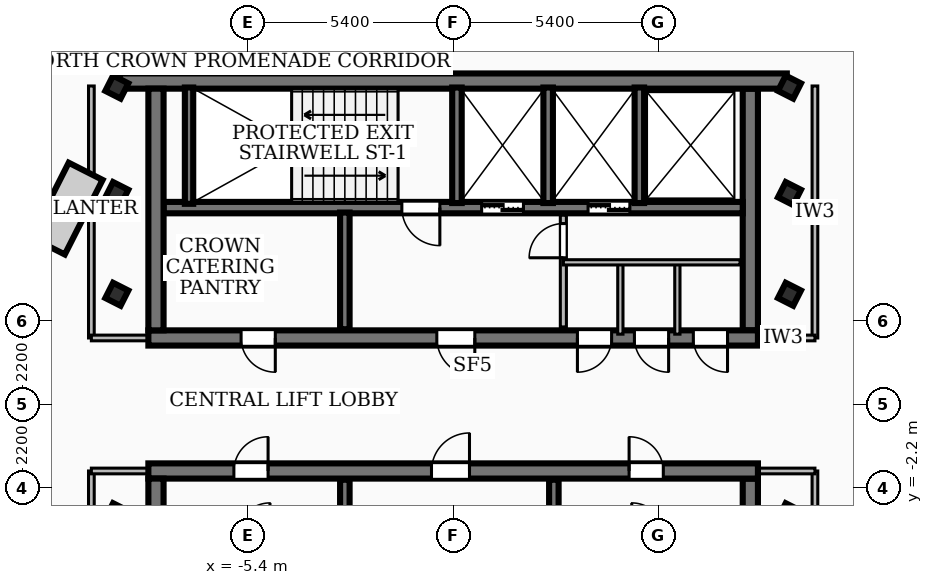
"""IFC4 building model, lengths in metres.
Left out: names, types, materials, properties, quantities, classifications, styles, units other than length and angle.
Written with IfcOpenShell. Run it as: python <this file> out.ifc"""

import sys

from ifc_helpers import new_model, si_unit, direction, frame, frame_2d, origin, origin_2d, place, context, subcontext, project, spatial, rectangle, hollow_rectangle, extrude, element, fill, save


model = new_model("IFC4")
c1 = context("Model", 3, precision=1e-05, world=origin(), true_north=direction((0.0, 1.0)))
c2 = subcontext(c1, "Body", "Model", "MODEL_VIEW")
j1 = project(units=[si_unit("LENGTHUNIT", "METRE"), si_unit("PLANEANGLEUNIT", "RADIAN")], contexts=[c1])
p1 = place(None, origin())
s1 = spatial("IfcSite", under=j1, at=p1, CompositionType="ELEMENT")
p2 = place(p1, origin())
s2 = spatial("IfcBuilding", under=s1, at=p2, CompositionType="ELEMENT")
p3 = place(p2, frame((0.0, 0.0, 289.26)))
s3 = spatial("IfcBuildingStorey", under=s2, at=p3, CompositionType="ELEMENT", Elevation=289.26)
p4 = place(p3, frame((-8.78, 8.51, 0.0), z_axis=(0.0, 0.0, 1.0), x_axis=(1.0, 0.0, 0.0)))
e1 = element("IfcWall", 1, at=p4, inside=s3, PredefinedType="SHEAR", context=c2, shape_type="SweptSolid", body=[
    extrude(rectangle(XDim=17.56, YDim=0.4, at=frame_2d((8.78, 0.0))), origin(), (0.0, 0.0, 1.0), 3.84),
])
p5 = place(p3, frame((8.02, 1.75, 0.0), z_axis=(0.0, 0.0, 1.0), x_axis=(-1.0, 0.0, 0.0)))
e2 = element("IfcWall", 2, at=p5, inside=s3, PredefinedType="SHEAR", context=c2, shape_type="SweptSolid", body=[
    extrude(rectangle(XDim=16.04, YDim=0.4, at=frame_2d((8.02, 0.0))), origin(), (0.0, 0.0, 1.0), 3.84),
])
p6 = place(p5, frame((7.45, 0.0, 0.0)))
e3 = element("IfcOpeningElement", 3, at=p6, cuts=e2, PredefinedType="OPENING", context=c2, shape_type="SweptSolid", body=[
    extrude(rectangle(XDim=1.0, YDim=2.1, at=frame_2d((0.5, 1.05))), frame((0.0, 0.21, 0.0), z_axis=(0.0, -1.0, 0.0), x_axis=(1.0, 0.0, 0.0)), (0.0, 0.0, 1.0), 0.42),
])
p7 = place(p5, frame((12.7, 0.0, 0.0)))
e4 = element("IfcOpeningElement", 4, at=p7, cuts=e2, PredefinedType="OPENING", context=c2, shape_type="SweptSolid", body=[
    extrude(rectangle(XDim=0.9, YDim=2.06, at=frame_2d((0.45, 1.03))), frame((0.0, 0.21, 0.0), z_axis=(0.0, -1.0, 0.0), x_axis=(1.0, 0.0, 0.0)), (0.0, 0.0, 1.0), 0.42),
])
p8 = place(p5, frame((3.85, 0.0, 0.0)))
e5 = element("IfcOpeningElement", 5, at=p8, cuts=e2, PredefinedType="OPENING", context=c2, shape_type="SweptSolid", body=[
    extrude(rectangle(XDim=0.9, YDim=2.06, at=frame_2d((0.45, 1.03))), frame((0.0, 0.21, 0.0), z_axis=(0.0, -1.0, 0.0), x_axis=(1.0, 0.0, 0.0)), (0.0, 0.0, 1.0), 0.42),
])
p9 = place(p5, frame((2.35, 0.0, 0.0)))
e6 = element("IfcOpeningElement", 6, at=p9, cuts=e2, PredefinedType="OPENING", context=c2, shape_type="SweptSolid", body=[
    extrude(rectangle(XDim=0.9, YDim=2.06, at=frame_2d((0.45, 1.03))), frame((0.0, 0.21, 0.0), z_axis=(0.0, -1.0, 0.0), x_axis=(1.0, 0.0, 0.0)), (0.0, 0.0, 1.0), 0.42),
])
p10 = place(p5, frame((0.8, 0.0, 0.0)))
e7 = element("IfcOpeningElement", 7, at=p10, cuts=e2, PredefinedType="OPENING", context=c2, shape_type="SweptSolid", body=[
    extrude(rectangle(XDim=0.9, YDim=2.06, at=frame_2d((0.45, 1.03))), frame((0.0, 0.21, 0.0), z_axis=(0.0, -1.0, 0.0), x_axis=(1.0, 0.0, 0.0)), (0.0, 0.0, 1.0), 0.42),
])
for number, where, z_axis, x_axis in (
    (8, (-7.82, 1.95, 0.0), (0.0, 0.0, 1.0), (0.0, 1.0, 0.0)),
    (9, (7.82, 8.31, 0.0), (0.0, 0.0, 1.0), (0.0, -1.0, 0.0)),
):
    element("IfcWall", number, at=place(p3, frame(where, z_axis=z_axis, x_axis=x_axis)), inside=s3, PredefinedType="SHEAR", context=c2, shape_type="SweptSolid", body=[
        extrude(rectangle(XDim=6.36, YDim=0.4, at=frame_2d((3.18, 0.0))), origin(), (0.0, 0.0, 1.0), 3.84),
    ])
p11 = place(p3, frame((7.62, 5.18, 0.0), z_axis=(0.0, 0.0, 1.0), x_axis=(-1.0, 0.0, 0.0)))
e10 = element("IfcWall", 10, at=p11, inside=s3, PredefinedType="SOLIDWALL", context=c2, shape_type="SweptSolid", body=[
    extrude(rectangle(XDim=15.24, YDim=0.3, at=frame_2d((7.62, 0.0))), origin(), (0.0, 0.0, 1.0), 3.84),
])
p12 = place(p11, frame((5.77, 0.0, 0.0)))
e11 = element("IfcOpeningElement", 11, at=p12, cuts=e10, PredefinedType="OPENING", context=c2, shape_type="SweptSolid", body=[
    extrude(rectangle(XDim=1.1, YDim=2.15, at=frame_2d((0.55, 1.075))), frame((0.0, 0.16, 0.0), z_axis=(0.0, -1.0, 0.0), x_axis=(1.0, 0.0, 0.0)), (0.0, 0.0, 1.0), 0.32),
])
p13 = place(p11, frame((2.97, 0.0, 0.0)))
e12 = element("IfcOpeningElement", 12, at=p13, cuts=e10, PredefinedType="OPENING", context=c2, shape_type="SweptSolid", body=[
    extrude(rectangle(XDim=1.1, YDim=2.15, at=frame_2d((0.55, 1.075))), frame((0.0, 0.16, 0.0), z_axis=(0.0, -1.0, 0.0), x_axis=(1.0, 0.0, 0.0)), (0.0, 0.0, 1.0), 0.32),
])
p14 = place(p11, frame((7.97, 0.0, 0.0)))
e13 = element("IfcOpeningElement", 13, at=p14, cuts=e10, PredefinedType="OPENING", context=c2, shape_type="SweptSolid", body=[
    extrude(rectangle(XDim=1.0, YDim=2.1, at=frame_2d((0.5, 1.05))), frame((0.0, 0.16, 0.0), z_axis=(0.0, -1.0, 0.0), x_axis=(1.0, 0.0, 0.0)), (0.0, 0.0, 1.0), 0.32),
])
p15 = place(p3, frame((-8.02, -1.75, 0.0), z_axis=(0.0, 0.0, 1.0), x_axis=(1.0, 0.0, 0.0)))
e14 = element("IfcWall", 14, at=p15, inside=s3, PredefinedType="SHEAR", context=c2, shape_type="SweptSolid", body=[
    extrude(rectangle(XDim=16.04, YDim=0.4, at=frame_2d((8.02, 0.0))), origin(), (0.0, 0.0, 1.0), 3.84),
])
p16 = place(p15, frame((7.45, 0.0, 0.0)))
e15 = element("IfcOpeningElement", 15, at=p16, cuts=e14, PredefinedType="OPENING", context=c2, shape_type="SweptSolid", body=[
    extrude(rectangle(XDim=1.0, YDim=2.1, at=frame_2d((0.5, 1.05))), frame((0.0, 0.21, 0.0), z_axis=(0.0, -1.0, 0.0), x_axis=(1.0, 0.0, 0.0)), (0.0, 0.0, 1.0), 0.42),
])
p17 = place(p15, frame((12.65, 0.0, 0.0)))
e16 = element("IfcOpeningElement", 16, at=p17, cuts=e14, PredefinedType="OPENING", context=c2, shape_type="SweptSolid", body=[
    extrude(rectangle(XDim=0.9, YDim=2.06, at=frame_2d((0.45, 1.03))), frame((0.0, 0.21, 0.0), z_axis=(0.0, -1.0, 0.0), x_axis=(1.0, 0.0, 0.0)), (0.0, 0.0, 1.0), 0.42),
])
p18 = place(p15, frame((2.25, 0.0, 0.0)))
e17 = element("IfcOpeningElement", 17, at=p18, cuts=e14, PredefinedType="OPENING", context=c2, shape_type="SweptSolid", body=[
    extrude(rectangle(XDim=0.9, YDim=2.06, at=frame_2d((0.45, 1.03))), frame((0.0, 0.21, 0.0), z_axis=(0.0, -1.0, 0.0), x_axis=(1.0, 0.0, 0.0)), (0.0, 0.0, 1.0), 0.42),
])
for number, where, z_axis, x_axis in (
    (18, (-7.82, -8.31, 0.0), (0.0, 0.0, 1.0), (0.0, 1.0, 0.0)),
    (19, (7.82, -1.95, 0.0), (0.0, 0.0, 1.0), (0.0, -1.0, 0.0)),
):
    element("IfcWall", number, at=place(p3, frame(where, z_axis=z_axis, x_axis=x_axis)), inside=s3, PredefinedType="SHEAR", context=c2, shape_type="SweptSolid", body=[
        extrude(rectangle(XDim=6.36, YDim=0.4, at=frame_2d((3.18, 0.0))), origin(), (0.0, 0.0, 1.0), 3.84),
    ])
p19 = place(p3, frame((-6.95, 5.28, 0.0), z_axis=(0.0, 0.0, 1.0), x_axis=(0.0, 1.0, 0.0)))
e20 = element("IfcWall", 20, at=p19, inside=s3, PredefinedType="SOLIDWALL", context=c2, shape_type="SweptSolid", body=[
    extrude(rectangle(XDim=3.06, YDim=0.22, at=frame_2d((1.53, 0.0))), origin(), (0.0, 0.0, 1.0), 3.84),
])
for number, where, z_axis, x_axis in (
    (21, (0.1, 5.3, 0.0), (0.0, 0.0, 1.0), (0.0, 1.0, 0.0)),
    (22, (2.5, 5.3, 0.0), (0.0, 0.0, 1.0), (0.0, 1.0, 0.0)),
    (23, (4.9, 5.3, 0.0), (0.0, 0.0, 1.0), (0.0, 1.0, 0.0)),
):
    element("IfcWall", number, at=place(p3, frame(where, z_axis=z_axis, x_axis=x_axis)), inside=s3, PredefinedType="SOLIDWALL", context=c2, shape_type="SweptSolid", body=[
        extrude(rectangle(XDim=3.04, YDim=0.25, at=frame_2d((1.52, 0.0))), origin(), (0.0, 0.0, 1.0), 3.84),
    ])
for number, where, z_axis, x_axis in (
    (24, (-2.85, 1.98, 0.0), (0.0, 0.0, 1.0), (0.0, 1.0, 0.0)),
    (25, (-2.85, -5.05, 0.0), (0.0, 0.0, 1.0), (0.0, 1.0, 0.0)),
    (26, (2.65, -5.05, 0.0), (0.0, 0.0, 1.0), (0.0, 1.0, 0.0)),
):
    element("IfcWall", number, at=place(p3, frame(where, z_axis=z_axis, x_axis=x_axis)), inside=s3, PredefinedType="SOLIDWALL", context=c2, shape_type="SweptSolid", body=[
        extrude(rectangle(XDim=3.07, YDim=0.25, at=frame_2d((1.535, 0.0))), origin(), (0.0, 0.0, 1.0), 3.84),
    ])
for number, where, z_axis, x_axis in (
    (27, (-8.85, -2.9, 0.0), (0.0, 0.0, 1.0), (0.452, 0.892, 0.0)),
    (28, (-8.85, 2.9, 0.0), (0.0, 0.0, 1.0), (0.452, 0.892, 0.0)),
    (29, (-8.85, 5.55, 0.0), (0.0, 0.0, 1.0), (0.452, 0.892, 0.0)),
    (30, (8.85, -2.9, 0.0), (0.0, 0.0, 1.0), (0.452, 0.892, 0.0)),
    (31, (8.85, 2.9, 0.0), (0.0, 0.0, 1.0), (0.452, 0.892, 0.0)),
    (32, (8.85, 5.55, 0.0), (0.0, 0.0, 1.0), (0.452, 0.892, 0.0)),
    (33, (-8.85, 8.35, 0.0), (0.0, 0.0, 1.0), (0.452, 0.892, 0.0)),
    (34, (8.85, 8.35, 0.0), (0.0, 0.0, 1.0), (0.452, 0.892, 0.0)),
):
    element("IfcColumn", number, at=place(p3, frame(where, z_axis=z_axis, x_axis=x_axis)), inside=s3, PredefinedType="COLUMN", context=c2, shape_type="SweptSolid", body=[
        extrude(hollow_rectangle(XDim=0.45, YDim=0.45, WallThickness=0.022, at=origin_2d()), origin(), (0.0, 0.0, 1.0), 4.14),
    ])
p20 = place(p3, frame((2.9, 2.04, 0.0), z_axis=(0.0, 0.0, 1.0), x_axis=(0.0, 1.0, 0.0)))
e35 = element("IfcWall", 35, at=p20, inside=s3, PredefinedType="PARTITIONING", context=c2, shape_type="SweptSolid", body=[
    extrude(rectangle(XDim=2.94, YDim=0.16, at=frame_2d((1.47, 0.0))), origin(), (0.0, 0.0, 1.0), 3.07),
])
p21 = place(p20, frame((1.82, 0.0, 0.0)))
e36 = element("IfcOpeningElement", 36, at=p21, cuts=e35, PredefinedType="OPENING", context=c2, shape_type="SweptSolid", body=[
    extrude(rectangle(XDim=0.9, YDim=2.06, at=frame_2d((0.45, 1.03))), frame((0.0, 0.09, 0.0), z_axis=(0.0, -1.0, 0.0), x_axis=(1.0, 0.0, 0.0)), (0.0, 0.0, 1.0), 0.18),
])
p22 = place(p3, frame((2.9, 3.74, 0.0), z_axis=(0.0, 0.0, 1.0), x_axis=(1.0, 0.0, 0.0)))
e37 = element("IfcWall", 37, at=p22, inside=s3, PredefinedType="PARTITIONING", context=c2, shape_type="SweptSolid", body=[
    extrude(rectangle(XDim=4.65, YDim=0.138, at=frame_2d((2.325, 0.0))), origin(), (0.0, 0.0, 1.0), 3.84),
])
for number, where, z_axis, x_axis in (
    (38, (4.4, 1.85, 0.0), (0.0, 0.0, 1.0), (0.0, 1.0, 0.0)),
    (39, (5.9, 1.85, 0.0), (0.0, 0.0, 1.0), (0.0, 1.0, 0.0)),
):
    element("IfcWall", number, at=place(p3, frame(where, z_axis=z_axis, x_axis=x_axis)), inside=s3, PredefinedType="PARTITIONING", context=c2, shape_type="SweptSolid", body=[
        extrude(rectangle(XDim=1.89, YDim=0.138, at=frame_2d((0.945, 0.0))), origin(), (0.0, 0.0, 1.0), 3.07),
    ])
p23 = place(p3, frame((-9.52, 1.75, 0.0), z_axis=(0.0, 0.0, 1.0), x_axis=(0.0, 1.0, 0.0)))
e40 = element("IfcWall", 40, at=p23, inside=s3, PredefinedType="PARTITIONING", context=c2, shape_type="SweptSolid", body=[
    extrude(rectangle(XDim=6.63, YDim=0.15, at=frame_2d((3.315, 0.0))), origin(), (0.0, 0.0, 1.0), 3.21),
])
p24 = place(p3, frame((-7.85, 1.75, 0.0), z_axis=(0.0, 0.0, 1.0), x_axis=(-1.0, 0.0, 0.0)))
e41 = element("IfcWall", 41, at=p24, inside=s3, PredefinedType="PARTITIONING", context=c2, shape_type="SweptSolid", body=[
    extrude(rectangle(XDim=1.67, YDim=0.15, at=frame_2d((0.835, 0.0))), origin(), (0.0, 0.0, 1.0), 3.07),
])
p25 = place(p3, frame((-9.52, -8.38, 0.0), z_axis=(0.0, 0.0, 1.0), x_axis=(0.0, 1.0, 0.0)))
e42 = element("IfcWall", 42, at=p25, inside=s3, PredefinedType="PARTITIONING", context=c2, shape_type="SweptSolid", body=[
    extrude(rectangle(XDim=6.63, YDim=0.15, at=frame_2d((3.315, 0.0))), origin(), (0.0, 0.0, 1.0), 3.84),
])
p26 = place(p3, frame((-7.85, -1.75, 0.0), z_axis=(0.0, 0.0, 1.0), x_axis=(-1.0, 0.0, 0.0)))
e43 = element("IfcWall", 43, at=p26, inside=s3, PredefinedType="PARTITIONING", context=c2, shape_type="SweptSolid", body=[
    extrude(rectangle(XDim=1.67, YDim=0.15, at=frame_2d((0.835, 0.0))), origin(), (0.0, 0.0, 1.0), 3.07),
])
p27 = place(p3, frame((9.52, 1.75, 0.0), z_axis=(0.0, 0.0, 1.0), x_axis=(0.0, 1.0, 0.0)))
e44 = element("IfcWall", 44, at=p27, inside=s3, PredefinedType="PARTITIONING", context=c2, shape_type="SweptSolid", body=[
    extrude(rectangle(XDim=6.63, YDim=0.15, at=frame_2d((3.315, 0.0))), origin(), (0.0, 0.0, 1.0), 3.84),
])
p28 = place(p3, frame((7.85, 1.75, 0.0), z_axis=(0.0, 0.0, 1.0), x_axis=(1.0, 0.0, 0.0)))
e45 = element("IfcWall", 45, at=p28, inside=s3, PredefinedType="PARTITIONING", context=c2, shape_type="SweptSolid", body=[
    extrude(rectangle(XDim=1.67, YDim=0.15, at=frame_2d((0.835, 0.0))), origin(), (0.0, 0.0, 1.0), 3.07),
])
p29 = place(p3, frame((9.52, -8.38, 0.0), z_axis=(0.0, 0.0, 1.0), x_axis=(0.0, 1.0, 0.0)))
e46 = element("IfcWall", 46, at=p29, inside=s3, PredefinedType="PARTITIONING", context=c2, shape_type="SweptSolid", body=[
    extrude(rectangle(XDim=6.63, YDim=0.15, at=frame_2d((3.315, 0.0))), origin(), (0.0, 0.0, 1.0), 3.21),
])
p30 = place(p3, frame((7.85, -1.75, 0.0), z_axis=(0.0, 0.0, 1.0), x_axis=(1.0, 0.0, 0.0)))
e47 = element("IfcWall", 47, at=p30, inside=s3, PredefinedType="PARTITIONING", context=c2, shape_type="SweptSolid", body=[
    extrude(rectangle(XDim=1.67, YDim=0.15, at=frame_2d((0.835, 0.0))), origin(), (0.0, 0.0, 1.0), 3.07),
])
p31 = place(p6, origin())
e48 = element("IfcDoor", 48, at=p31, inside=s3, OperationType="SINGLE_SWING_LEFT", PredefinedType="DOOR", context=c2, shape_type="SweptSolid", body=[
    extrude(rectangle(XDim=1.0, YDim=2.1, at=frame_2d((0.5, 1.05))), frame((0.0, 0.025, 0.0), z_axis=(0.0, -1.0, 0.0), x_axis=(1.0, 0.0, 0.0)), (0.0, 0.0, 1.0), 0.05),
])
fill(e3, e48)
p32 = place(p16, origin())
e49 = element("IfcDoor", 49, at=p32, inside=s3, OperationType="SINGLE_SWING_RIGHT", PredefinedType="DOOR", context=c2, shape_type="SweptSolid", body=[
    extrude(rectangle(XDim=1.0, YDim=2.1, at=frame_2d((0.5, 1.05))), frame((0.0, 0.025, 0.0), z_axis=(0.0, -1.0, 0.0), x_axis=(1.0, 0.0, 0.0)), (0.0, 0.0, 1.0), 0.05),
])
fill(e15, e49)
p33 = place(p12, origin())
e50 = element("IfcDoor", 50, at=p33, inside=s3, OperationType="DOUBLE_DOOR_SLIDING", PredefinedType="DOOR", context=c2, shape_type="SweptSolid", body=[
    extrude(rectangle(XDim=1.1, YDim=2.15, at=frame_2d((0.55, 1.075))), frame((0.0, 0.025, 0.0), z_axis=(0.0, -1.0, 0.0), x_axis=(1.0, 0.0, 0.0)), (0.0, 0.0, 1.0), 0.05),
])
fill(e11, e50)
p34 = place(p13, origin())
e51 = element("IfcDoor", 51, at=p34, inside=s3, OperationType="DOUBLE_DOOR_SLIDING", PredefinedType="DOOR", context=c2, shape_type="SweptSolid", body=[
    extrude(rectangle(XDim=1.1, YDim=2.15, at=frame_2d((0.55, 1.075))), frame((0.0, 0.025, 0.0), z_axis=(0.0, -1.0, 0.0), x_axis=(1.0, 0.0, 0.0)), (0.0, 0.0, 1.0), 0.05),
])
fill(e12, e51)
p35 = place(p14, origin())
e52 = element("IfcDoor", 52, at=p35, inside=s3, OperationType="SINGLE_SWING_LEFT", PredefinedType="DOOR", context=c2, shape_type="SweptSolid", body=[
    extrude(rectangle(XDim=1.0, YDim=2.1, at=frame_2d((0.5, 1.05))), frame((0.0, 0.025, 0.0), z_axis=(0.0, -1.0, 0.0), x_axis=(1.0, 0.0, 0.0)), (0.0, 0.0, 1.0), 0.05),
])
fill(e13, e52)
p36 = place(p7, origin())
e53 = element("IfcDoor", 53, at=p36, inside=s3, OperationType="SINGLE_SWING_LEFT", PredefinedType="DOOR", context=c2, shape_type="SweptSolid", body=[
    extrude(rectangle(XDim=0.9, YDim=2.06, at=frame_2d((0.45, 1.03))), frame((0.0, 0.025, 0.0), z_axis=(0.0, -1.0, 0.0), x_axis=(1.0, 0.0, 0.0)), (0.0, 0.0, 1.0), 0.05),
])
fill(e4, e53)
p37 = place(p17, origin())
e54 = element("IfcDoor", 54, at=p37, inside=s3, OperationType="SINGLE_SWING_LEFT", PredefinedType="DOOR", context=c2, shape_type="SweptSolid", body=[
    extrude(rectangle(XDim=0.9, YDim=2.06, at=frame_2d((0.45, 1.03))), frame((0.0, 0.025, 0.0), z_axis=(0.0, -1.0, 0.0), x_axis=(1.0, 0.0, 0.0)), (0.0, 0.0, 1.0), 0.05),
])
fill(e16, e54)
p38 = place(p18, origin())
e55 = element("IfcDoor", 55, at=p38, inside=s3, OperationType="SINGLE_SWING_RIGHT", PredefinedType="DOOR", context=c2, shape_type="SweptSolid", body=[
    extrude(rectangle(XDim=0.9, YDim=2.06, at=frame_2d((0.45, 1.03))), frame((0.0, 0.025, 0.0), z_axis=(0.0, -1.0, 0.0), x_axis=(1.0, 0.0, 0.0)), (0.0, 0.0, 1.0), 0.05),
])
fill(e17, e55)
p39 = place(p8, origin())
e56 = element("IfcDoor", 56, at=p39, inside=s3, OperationType="SINGLE_SWING_RIGHT", PredefinedType="DOOR", context=c2, shape_type="SweptSolid", body=[
    extrude(rectangle(XDim=0.9, YDim=2.06, at=frame_2d((0.45, 1.03))), frame((0.0, 0.025, 0.0), z_axis=(0.0, -1.0, 0.0), x_axis=(1.0, 0.0, 0.0)), (0.0, 0.0, 1.0), 0.05),
])
fill(e5, e56)
p40 = place(p9, origin())
e57 = element("IfcDoor", 57, at=p40, inside=s3, OperationType="SINGLE_SWING_LEFT", PredefinedType="DOOR", context=c2, shape_type="SweptSolid", body=[
    extrude(rectangle(XDim=0.9, YDim=2.06, at=frame_2d((0.45, 1.03))), frame((0.0, 0.025, 0.0), z_axis=(0.0, -1.0, 0.0), x_axis=(1.0, 0.0, 0.0)), (0.0, 0.0, 1.0), 0.05),
])
fill(e6, e57)
p41 = place(p10, origin())
e58 = element("IfcDoor", 58, at=p41, inside=s3, OperationType="SINGLE_SWING_LEFT", PredefinedType="DOOR", context=c2, shape_type="SweptSolid", body=[
    extrude(rectangle(XDim=0.9, YDim=2.06, at=frame_2d((0.45, 1.03))), frame((0.0, 0.025, 0.0), z_axis=(0.0, -1.0, 0.0), x_axis=(1.0, 0.0, 0.0)), (0.0, 0.0, 1.0), 0.05),
])
fill(e7, e58)
p42 = place(p21, origin())
e59 = element("IfcDoor", 59, at=p42, inside=s3, OperationType="SINGLE_SWING_LEFT", PredefinedType="DOOR", context=c2, shape_type="SweptSolid", body=[
    extrude(rectangle(XDim=0.9, YDim=2.06, at=frame_2d((0.45, 1.03))), frame((0.0, 0.025, 0.0), z_axis=(0.0, -1.0, 0.0), x_axis=(1.0, 0.0, 0.0)), (0.0, 0.0, 1.0), 0.05),
])
fill(e36, e59)
save(model, sys.argv[1])
